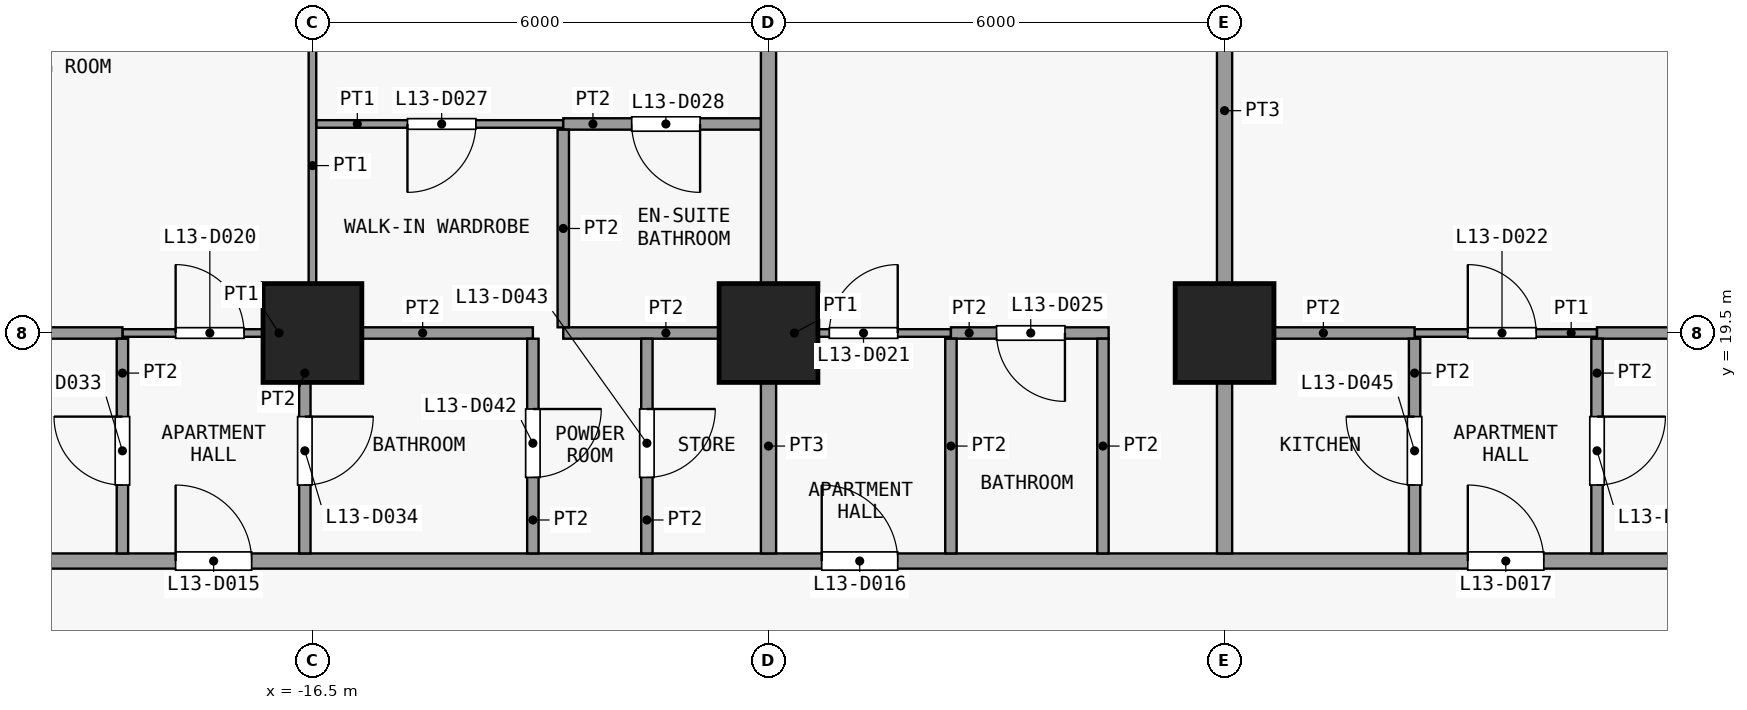
"""IFC4 building model, lengths in metres.
Left out: names, types, materials, properties, quantities, classifications, styles, units other than length and angle.
Written with IfcOpenShell. Run it as: python <this file> out.ifc"""

import sys

from ifc_helpers import new_model, si_unit, direction, frame, frame_2d, origin, origin_2d, place, context, subcontext, project, spatial, rectangle, extrude, element, fill, save


model = new_model("IFC4")
c1 = context("Model", 3, precision=1e-05, world=origin(), true_north=direction((0.0, 1.0)))
c2 = subcontext(c1, "Body", "Model", "MODEL_VIEW")
j1 = project(units=[si_unit("LENGTHUNIT", "METRE"), si_unit("PLANEANGLEUNIT", "RADIAN")], contexts=[c1])
p1 = place(None, origin())
s1 = spatial("IfcSite", under=j1, at=p1, CompositionType="ELEMENT")
p2 = place(p1, origin())
s2 = spatial("IfcBuilding", under=s1, at=p2, CompositionType="ELEMENT")
p3 = place(p2, frame((0.0, 0.0, 57.7)))
s3 = spatial("IfcBuildingStorey", under=s2, at=p3, CompositionType="ELEMENT", Elevation=57.7)
for number, where, z_axis, x_axis in (
    (1, (-16.5, 19.5, 0.0), (0.0, 0.0, 1.0), (1.0, 0.0, 0.0)),
    (2, (-10.5, 19.5, 0.0), (0.0, 0.0, 1.0), (1.0, 0.0, 0.0)),
    (3, (-4.5, 19.5, 0.0), (0.0, 0.0, 1.0), (1.0, 0.0, 0.0)),
):
    element("IfcColumn", number, at=place(p3, frame(where, z_axis=z_axis, x_axis=x_axis)), inside=s3, PredefinedType="COLUMN", context=c2, shape_type="SweptSolid", body=[
        extrude(rectangle(XDim=1.3, YDim=1.3, at=origin_2d()), origin(), (0.0, 0.0, 1.0), 3.6),
    ])
p4 = place(p3, frame((-25.35, 16.5, 0.0), z_axis=(0.0, 0.0, 1.0), x_axis=(1.0, 0.0, 0.0)))
e4 = element("IfcWall", 4, at=p4, inside=s3, PredefinedType="PARTITIONING", context=c2, shape_type="SweptSolid", body=[
    extrude(rectangle(XDim=50.7, YDim=0.2, at=frame_2d((25.35, 0.0))), origin(), (0.0, 0.0, 1.0), 3.3),
])
p5 = place(p4, frame((7.05, 0.0, 0.0)))
e5 = element("IfcOpeningElement", 5, at=p5, cuts=e4, PredefinedType="OPENING", context=c2, shape_type="SweptSolid", body=[
    extrude(rectangle(XDim=1.0, YDim=2.1, at=frame_2d((0.5, 1.05))), frame((0.0, 0.11, 0.0), z_axis=(0.0, -1.0, 0.0), x_axis=(1.0, 0.0, 0.0)), (0.0, 0.0, 1.0), 0.22),
])
p6 = place(p4, frame((15.55, 0.0, 0.0)))
e6 = element("IfcOpeningElement", 6, at=p6, cuts=e4, PredefinedType="OPENING", context=c2, shape_type="SweptSolid", body=[
    extrude(rectangle(XDim=1.0, YDim=2.1, at=frame_2d((0.5, 1.05))), frame((0.0, 0.11, 0.0), z_axis=(0.0, -1.0, 0.0), x_axis=(1.0, 0.0, 0.0)), (0.0, 0.0, 1.0), 0.22),
])
p7 = place(p4, frame((24.05, 0.0, 0.0)))
e7 = element("IfcOpeningElement", 7, at=p7, cuts=e4, PredefinedType="OPENING", context=c2, shape_type="SweptSolid", body=[
    extrude(rectangle(XDim=1.0, YDim=2.1, at=frame_2d((0.5, 1.05))), frame((0.0, 0.11, 0.0), z_axis=(0.0, -1.0, 0.0), x_axis=(1.0, 0.0, 0.0)), (0.0, 0.0, 1.0), 0.22),
])
p8 = place(p4, frame((36.55, 0.0, 0.0)))
e8 = element("IfcOpeningElement", 8, at=p8, cuts=e4, PredefinedType="OPENING", context=c2, shape_type="SweptSolid", body=[
    extrude(rectangle(XDim=1.0, YDim=2.1, at=frame_2d((0.5, 1.05))), frame((0.0, 0.11, 0.0), z_axis=(0.0, -1.0, 0.0), x_axis=(1.0, 0.0, 0.0)), (0.0, 0.0, 1.0), 0.22),
])
p9 = place(p4, frame((45.05, 0.0, 0.0)))
e9 = element("IfcOpeningElement", 9, at=p9, cuts=e4, PredefinedType="OPENING", context=c2, shape_type="SweptSolid", body=[
    extrude(rectangle(XDim=1.0, YDim=2.1, at=frame_2d((0.5, 1.05))), frame((0.0, 0.11, 0.0), z_axis=(0.0, -1.0, 0.0), x_axis=(1.0, 0.0, 0.0)), (0.0, 0.0, 1.0), 0.22),
])
p10 = place(p3, frame((-19.0, 19.5, 0.0), z_axis=(0.0, 0.0, 1.0), x_axis=(1.0, 0.0, 0.0)))
e10 = element("IfcWall", 10, at=p10, inside=s3, PredefinedType="PARTITIONING", context=c2, shape_type="SweptSolid", body=[
    extrude(rectangle(XDim=2.4, YDim=0.1, at=frame_2d((1.2, 0.0))), origin(), (0.0, 0.0, 1.0), 3.3),
])
p11 = place(p10, frame((0.7, 0.0, 0.0)))
e11 = element("IfcOpeningElement", 11, at=p11, cuts=e10, PredefinedType="OPENING", context=c2, shape_type="SweptSolid", body=[
    extrude(rectangle(XDim=0.9, YDim=2.1, at=frame_2d((0.45, 1.05))), frame((0.0, 0.06, 0.0), z_axis=(0.0, -1.0, 0.0), x_axis=(1.0, 0.0, 0.0)), (0.0, 0.0, 1.0), 0.12),
])
p12 = place(p3, frame((-10.5, 19.5, 0.0), z_axis=(0.0, 0.0, 1.0), x_axis=(1.0, 0.0, 0.0)))
e12 = element("IfcWall", 12, at=p12, inside=s3, PredefinedType="PARTITIONING", context=c2, shape_type="SweptSolid", body=[
    extrude(rectangle(XDim=2.4, YDim=0.1, at=frame_2d((1.2, 0.0))), origin(), (0.0, 0.0, 1.0), 3.3),
])
p13 = place(p12, frame((0.8, 0.0, 0.0)))
e13 = element("IfcOpeningElement", 13, at=p13, cuts=e12, PredefinedType="OPENING", context=c2, shape_type="SweptSolid", body=[
    extrude(rectangle(XDim=0.9, YDim=2.1, at=frame_2d((0.45, 1.05))), frame((0.0, 0.06, 0.0), z_axis=(0.0, -1.0, 0.0), x_axis=(1.0, 0.0, 0.0)), (0.0, 0.0, 1.0), 0.12),
])
p14 = place(p3, frame((-2.0, 19.5, 0.0), z_axis=(0.0, 0.0, 1.0), x_axis=(1.0, 0.0, 0.0)))
e14 = element("IfcWall", 14, at=p14, inside=s3, PredefinedType="PARTITIONING", context=c2, shape_type="SweptSolid", body=[
    extrude(rectangle(XDim=2.4, YDim=0.1, at=frame_2d((1.2, 0.0))), origin(), (0.0, 0.0, 1.0), 3.3),
])
p15 = place(p14, frame((0.7, 0.0, 0.0)))
e15 = element("IfcOpeningElement", 15, at=p15, cuts=e14, PredefinedType="OPENING", context=c2, shape_type="SweptSolid", body=[
    extrude(rectangle(XDim=0.9, YDim=2.1, at=frame_2d((0.45, 1.05))), frame((0.0, 0.06, 0.0), z_axis=(0.0, -1.0, 0.0), x_axis=(1.0, 0.0, 0.0)), (0.0, 0.0, 1.0), 0.12),
])
p16 = place(p3, frame((-23.5, 19.5, 0.0), z_axis=(0.0, 0.0, 1.0), x_axis=(1.0, 0.0, 0.0)))
e16 = element("IfcWall", 16, at=p16, inside=s3, PredefinedType="PARTITIONING", context=c2, shape_type="SweptSolid", body=[
    extrude(rectangle(XDim=4.5, YDim=0.15, at=frame_2d((2.25, 0.0))), origin(), (0.0, 0.0, 1.0), 3.3),
])
p17 = place(p3, frame((-16.5, 19.5, 0.0), z_axis=(0.0, 0.0, 1.0), x_axis=(1.0, 0.0, 0.0)))
e17 = element("IfcWall", 17, at=p17, inside=s3, PredefinedType="PARTITIONING", context=c2, shape_type="SweptSolid", body=[
    extrude(rectangle(XDim=2.9, YDim=0.15, at=frame_2d((1.45, 0.0))), origin(), (0.0, 0.0, 1.0), 3.3),
])
p18 = place(p3, frame((-13.2, 19.5, 0.0), z_axis=(0.0, 0.0, 1.0), x_axis=(1.0, 0.0, 0.0)))
e18 = element("IfcWall", 18, at=p18, inside=s3, PredefinedType="PARTITIONING", context=c2, shape_type="SweptSolid", body=[
    extrude(rectangle(XDim=2.7, YDim=0.15, at=frame_2d((1.35, 0.0))), origin(), (0.0, 0.0, 1.0), 3.3),
])
p19 = place(p3, frame((-8.1, 19.5, 0.0), z_axis=(0.0, 0.0, 1.0), x_axis=(1.0, 0.0, 0.0)))
e19 = element("IfcWall", 19, at=p19, inside=s3, PredefinedType="PARTITIONING", context=c2, shape_type="SweptSolid", body=[
    extrude(rectangle(XDim=2.075, YDim=0.15, at=frame_2d((1.038, 0.0))), origin(), (0.0, 0.0, 1.0), 3.3),
])
p20 = place(p19, frame((0.6, 0.0, 0.0)))
e20 = element("IfcOpeningElement", 20, at=p20, cuts=e19, PredefinedType="OPENING", context=c2, shape_type="SweptSolid", body=[
    extrude(rectangle(XDim=0.9, YDim=2.1, at=frame_2d((0.45, 1.05))), frame((0.0, 0.085, 0.0), z_axis=(0.0, -1.0, 0.0), x_axis=(1.0, 0.0, 0.0)), (0.0, 0.0, 1.0), 0.17),
])
p21 = place(p3, frame((-4.4, 19.5, 0.0), z_axis=(0.0, 0.0, 1.0), x_axis=(1.0, 0.0, 0.0)))
e21 = element("IfcWall", 21, at=p21, inside=s3, PredefinedType="PARTITIONING", context=c2, shape_type="SweptSolid", body=[
    extrude(rectangle(XDim=2.4, YDim=0.15, at=frame_2d((1.2, 0.0))), origin(), (0.0, 0.0, 1.0), 3.3),
])
p22 = place(p3, frame((0.4, 19.5, 0.0), z_axis=(0.0, 0.0, 1.0), x_axis=(1.0, 0.0, 0.0)))
e22 = element("IfcWall", 22, at=p22, inside=s3, PredefinedType="PARTITIONING", context=c2, shape_type="SweptSolid", body=[
    extrude(rectangle(XDim=7.4, YDim=0.15, at=frame_2d((3.7, 0.0))), origin(), (0.0, 0.0, 1.0), 3.3),
])
p23 = place(p3, frame((-16.45, 22.25, 0.0), z_axis=(0.0, 0.0, 1.0), x_axis=(1.0, 0.0, 0.0)))
e23 = element("IfcWall", 23, at=p23, inside=s3, PredefinedType="PARTITIONING", context=c2, shape_type="SweptSolid", body=[
    extrude(rectangle(XDim=3.25, YDim=0.1, at=frame_2d((1.625, 0.0))), origin(), (0.0, 0.0, 1.0), 3.3),
])
p24 = place(p23, frame((1.2, 0.0, 0.0)))
e24 = element("IfcOpeningElement", 24, at=p24, cuts=e23, PredefinedType="OPENING", context=c2, shape_type="SweptSolid", body=[
    extrude(rectangle(XDim=0.9, YDim=2.1, at=frame_2d((0.45, 1.05))), frame((0.0, 0.06, 0.0), z_axis=(0.0, -1.0, 0.0), x_axis=(1.0, 0.0, 0.0)), (0.0, 0.0, 1.0), 0.12),
])
p25 = place(p3, frame((-13.2, 22.25, 0.0), z_axis=(0.0, 0.0, 1.0), x_axis=(1.0, 0.0, 0.0)))
e25 = element("IfcWall", 25, at=p25, inside=s3, PredefinedType="PARTITIONING", context=c2, shape_type="SweptSolid", body=[
    extrude(rectangle(XDim=2.6, YDim=0.15, at=frame_2d((1.3, 0.0))), origin(), (0.0, 0.0, 1.0), 3.3),
])
p26 = place(p25, frame((0.9, 0.0, 0.0)))
e26 = element("IfcOpeningElement", 26, at=p26, cuts=e25, PredefinedType="OPENING", context=c2, shape_type="SweptSolid", body=[
    extrude(rectangle(XDim=0.9, YDim=2.1, at=frame_2d((0.45, 1.05))), frame((0.0, 0.085, 0.0), z_axis=(0.0, -1.0, 0.0), x_axis=(1.0, 0.0, 0.0)), (0.0, 0.0, 1.0), 0.17),
])
p27 = place(p3, frame((-19.0, 16.6, 0.0), z_axis=(0.0, 0.0, 1.0), x_axis=(0.0, 1.0, 0.0)))
e27 = element("IfcWall", 27, at=p27, inside=s3, PredefinedType="PARTITIONING", context=c2, shape_type="SweptSolid", body=[
    extrude(rectangle(XDim=2.825, YDim=0.15, at=frame_2d((1.413, 0.0))), origin(), (0.0, 0.0, 1.0), 3.3),
])
p28 = place(p27, frame((0.9, 0.0, 0.0)))
e28 = element("IfcOpeningElement", 28, at=p28, cuts=e27, PredefinedType="OPENING", context=c2, shape_type="SweptSolid", body=[
    extrude(rectangle(XDim=0.9, YDim=2.1, at=frame_2d((0.45, 1.05))), frame((0.0, 0.085, 0.0), z_axis=(0.0, -1.0, 0.0), x_axis=(1.0, 0.0, 0.0)), (0.0, 0.0, 1.0), 0.17),
])
p29 = place(p3, frame((-16.6, 16.6, 0.0), z_axis=(0.0, 0.0, 1.0), x_axis=(0.0, 1.0, 0.0)))
e29 = element("IfcWall", 29, at=p29, inside=s3, PredefinedType="PARTITIONING", context=c2, shape_type="SweptSolid", body=[
    extrude(rectangle(XDim=2.825, YDim=0.15, at=frame_2d((1.413, 0.0))), origin(), (0.0, 0.0, 1.0), 3.3),
])
p30 = place(p29, frame((0.9, 0.0, 0.0)))
e30 = element("IfcOpeningElement", 30, at=p30, cuts=e29, PredefinedType="OPENING", context=c2, shape_type="SweptSolid", body=[
    extrude(rectangle(XDim=0.9, YDim=2.1, at=frame_2d((0.45, 1.05))), frame((0.0, 0.085, 0.0), z_axis=(0.0, -1.0, 0.0), x_axis=(1.0, 0.0, 0.0)), (0.0, 0.0, 1.0), 0.17),
])
p31 = place(p3, frame((-16.5, 19.575, 0.0), z_axis=(0.0, 0.0, 1.0), x_axis=(0.0, 1.0, 0.0)))
e31 = element("IfcWall", 31, at=p31, inside=s3, PredefinedType="PARTITIONING", context=c2, shape_type="SweptSolid", body=[
    extrude(rectangle(XDim=8.675, YDim=0.1, at=frame_2d((4.337, 0.0))), origin(), (0.0, 0.0, 1.0), 3.3),
])
p32 = place(p31, frame((4.375, 0.0, 0.0)))
e32 = element("IfcOpeningElement", 32, at=p32, cuts=e31, PredefinedType="OPENING", context=c2, shape_type="SweptSolid", body=[
    extrude(rectangle(XDim=0.9, YDim=2.1, at=frame_2d((0.45, 1.05))), frame((0.0, 0.06, 0.0), z_axis=(0.0, -1.0, 0.0), x_axis=(1.0, 0.0, 0.0)), (0.0, 0.0, 1.0), 0.12),
])
p33 = place(p3, frame((-13.6, 16.6, 0.0), z_axis=(0.0, 0.0, 1.0), x_axis=(0.0, 1.0, 0.0)))
e33 = element("IfcWall", 33, at=p33, inside=s3, PredefinedType="PARTITIONING", context=c2, shape_type="SweptSolid", body=[
    extrude(rectangle(XDim=2.825, YDim=0.15, at=frame_2d((1.413, 0.0))), origin(), (0.0, 0.0, 1.0), 3.3),
])
p34 = place(p33, frame((1.0, 0.0, 0.0)))
e34 = element("IfcOpeningElement", 34, at=p34, cuts=e33, PredefinedType="OPENING", context=c2, shape_type="SweptSolid", body=[
    extrude(rectangle(XDim=0.9, YDim=2.1, at=frame_2d((0.45, 1.05))), frame((0.0, 0.085, 0.0), z_axis=(0.0, -1.0, 0.0), x_axis=(1.0, 0.0, 0.0)), (0.0, 0.0, 1.0), 0.17),
])
p35 = place(p3, frame((-13.2, 19.575, 0.0), z_axis=(0.0, 0.0, 1.0), x_axis=(0.0, 1.0, 0.0)))
e35 = element("IfcWall", 35, at=p35, inside=s3, PredefinedType="PARTITIONING", context=c2, shape_type="SweptSolid", body=[
    extrude(rectangle(XDim=2.6, YDim=0.15, at=frame_2d((1.3, 0.0))), origin(), (0.0, 0.0, 1.0), 3.3),
])
p36 = place(p3, frame((-12.1, 16.6, 0.0), z_axis=(0.0, 0.0, 1.0), x_axis=(0.0, 1.0, 0.0)))
e36 = element("IfcWall", 36, at=p36, inside=s3, PredefinedType="PARTITIONING", context=c2, shape_type="SweptSolid", body=[
    extrude(rectangle(XDim=2.825, YDim=0.15, at=frame_2d((1.413, 0.0))), origin(), (0.0, 0.0, 1.0), 3.3),
])
p37 = place(p36, frame((1.0, 0.0, 0.0)))
e37 = element("IfcOpeningElement", 37, at=p37, cuts=e36, PredefinedType="OPENING", context=c2, shape_type="SweptSolid", body=[
    extrude(rectangle(XDim=0.9, YDim=2.1, at=frame_2d((0.45, 1.05))), frame((0.0, 0.085, 0.0), z_axis=(0.0, -1.0, 0.0), x_axis=(1.0, 0.0, 0.0)), (0.0, 0.0, 1.0), 0.17),
])
p38 = place(p3, frame((-10.5, 16.6, 0.0), z_axis=(0.0, 0.0, 1.0), x_axis=(0.0, 1.0, 0.0)))
e38 = element("IfcWall", 38, at=p38, inside=s3, PredefinedType="PARTITIONING", context=c2, shape_type="SweptSolid", body=[
    extrude(rectangle(XDim=2.825, YDim=0.2, at=frame_2d((1.413, 0.0))), origin(), (0.0, 0.0, 1.0), 3.3),
])
p39 = place(p3, frame((-10.5, 19.575, 0.0), z_axis=(0.0, 0.0, 1.0), x_axis=(0.0, 1.0, 0.0)))
e39 = element("IfcWall", 39, at=p39, inside=s3, PredefinedType="PARTITIONING", context=c2, shape_type="SweptSolid", body=[
    extrude(rectangle(XDim=8.675, YDim=0.2, at=frame_2d((4.337, 0.0))), origin(), (0.0, 0.0, 1.0), 3.3),
])
for number, where, z_axis, x_axis in (
    (40, (-8.1, 16.6, 0.0), (0.0, 0.0, 1.0), (0.0, 1.0, 0.0)),
    (41, (-6.1, 16.6, 0.0), (0.0, 0.0, 1.0), (0.0, 1.0, 0.0)),
):
    element("IfcWall", number, at=place(p3, frame(where, z_axis=z_axis, x_axis=x_axis)), inside=s3, PredefinedType="PARTITIONING", context=c2, shape_type="SweptSolid", body=[
        extrude(rectangle(XDim=2.825, YDim=0.15, at=frame_2d((1.413, 0.0))), origin(), (0.0, 0.0, 1.0), 3.3),
    ])
p40 = place(p3, frame((-4.5, 16.6, 0.0), z_axis=(0.0, 0.0, 1.0), x_axis=(0.0, 1.0, 0.0)))
e42 = element("IfcWall", 42, at=p40, inside=s3, PredefinedType="PARTITIONING", context=c2, shape_type="SweptSolid", body=[
    extrude(rectangle(XDim=11.65, YDim=0.2, at=frame_2d((5.825, 0.0))), origin(), (0.0, 0.0, 1.0), 3.3),
])
p41 = place(p3, frame((-2.0, 16.6, 0.0), z_axis=(0.0, 0.0, 1.0), x_axis=(0.0, 1.0, 0.0)))
e43 = element("IfcWall", 43, at=p41, inside=s3, PredefinedType="PARTITIONING", context=c2, shape_type="SweptSolid", body=[
    extrude(rectangle(XDim=2.825, YDim=0.15, at=frame_2d((1.413, 0.0))), origin(), (0.0, 0.0, 1.0), 3.3),
])
p42 = place(p41, frame((0.9, 0.0, 0.0)))
e44 = element("IfcOpeningElement", 44, at=p42, cuts=e43, PredefinedType="OPENING", context=c2, shape_type="SweptSolid", body=[
    extrude(rectangle(XDim=0.9, YDim=2.1, at=frame_2d((0.45, 1.05))), frame((0.0, 0.085, 0.0), z_axis=(0.0, -1.0, 0.0), x_axis=(1.0, 0.0, 0.0)), (0.0, 0.0, 1.0), 0.17),
])
p43 = place(p3, frame((0.4, 16.6, 0.0), z_axis=(0.0, 0.0, 1.0), x_axis=(0.0, 1.0, 0.0)))
e45 = element("IfcWall", 45, at=p43, inside=s3, PredefinedType="PARTITIONING", context=c2, shape_type="SweptSolid", body=[
    extrude(rectangle(XDim=2.825, YDim=0.15, at=frame_2d((1.413, 0.0))), origin(), (0.0, 0.0, 1.0), 3.3),
])
p44 = place(p43, frame((0.9, 0.0, 0.0)))
e46 = element("IfcOpeningElement", 46, at=p44, cuts=e45, PredefinedType="OPENING", context=c2, shape_type="SweptSolid", body=[
    extrude(rectangle(XDim=0.9, YDim=2.1, at=frame_2d((0.45, 1.05))), frame((0.0, 0.085, 0.0), z_axis=(0.0, -1.0, 0.0), x_axis=(1.0, 0.0, 0.0)), (0.0, 0.0, 1.0), 0.17),
])
p45 = place(p5, origin())
e47 = element("IfcDoor", 47, at=p45, inside=s3, OperationType="SINGLE_SWING_RIGHT", PredefinedType="DOOR", context=c2, shape_type="SweptSolid", body=[
    extrude(rectangle(XDim=1.0, YDim=2.1, at=frame_2d((0.5, 1.05))), frame((0.0, 0.025, 0.0), z_axis=(0.0, -1.0, 0.0), x_axis=(1.0, 0.0, 0.0)), (0.0, 0.0, 1.0), 0.05),
])
fill(e5, e47)
p46 = place(p6, origin())
e48 = element("IfcDoor", 48, at=p46, inside=s3, OperationType="SINGLE_SWING_RIGHT", PredefinedType="DOOR", context=c2, shape_type="SweptSolid", body=[
    extrude(rectangle(XDim=1.0, YDim=2.1, at=frame_2d((0.5, 1.05))), frame((0.0, 0.025, 0.0), z_axis=(0.0, -1.0, 0.0), x_axis=(1.0, 0.0, 0.0)), (0.0, 0.0, 1.0), 0.05),
])
fill(e6, e48)
p47 = place(p7, origin())
e49 = element("IfcDoor", 49, at=p47, inside=s3, OperationType="SINGLE_SWING_RIGHT", PredefinedType="DOOR", context=c2, shape_type="SweptSolid", body=[
    extrude(rectangle(XDim=1.0, YDim=2.1, at=frame_2d((0.5, 1.05))), frame((0.0, 0.025, 0.0), z_axis=(0.0, -1.0, 0.0), x_axis=(1.0, 0.0, 0.0)), (0.0, 0.0, 1.0), 0.05),
])
fill(e7, e49)
p48 = place(p11, origin())
e50 = element("IfcDoor", 50, at=p48, inside=s3, OperationType="SINGLE_SWING_RIGHT", PredefinedType="DOOR", context=c2, shape_type="SweptSolid", body=[
    extrude(rectangle(XDim=0.9, YDim=2.1, at=frame_2d((0.45, 1.05))), frame((0.0, 0.025, 0.0), z_axis=(0.0, -1.0, 0.0), x_axis=(1.0, 0.0, 0.0)), (0.0, 0.0, 1.0), 0.05),
])
fill(e11, e50)
p49 = place(p13, origin())
e51 = element("IfcDoor", 51, at=p49, inside=s3, OperationType="SINGLE_SWING_LEFT", PredefinedType="DOOR", context=c2, shape_type="SweptSolid", body=[
    extrude(rectangle(XDim=0.9, YDim=2.1, at=frame_2d((0.45, 1.05))), frame((0.0, 0.025, 0.0), z_axis=(0.0, -1.0, 0.0), x_axis=(1.0, 0.0, 0.0)), (0.0, 0.0, 1.0), 0.05),
])
fill(e13, e51)
p50 = place(p15, origin())
e52 = element("IfcDoor", 52, at=p50, inside=s3, OperationType="SINGLE_SWING_RIGHT", PredefinedType="DOOR", context=c2, shape_type="SweptSolid", body=[
    extrude(rectangle(XDim=0.9, YDim=2.1, at=frame_2d((0.45, 1.05))), frame((0.0, 0.025, 0.0), z_axis=(0.0, -1.0, 0.0), x_axis=(1.0, 0.0, 0.0)), (0.0, 0.0, 1.0), 0.05),
])
fill(e15, e52)
p51 = place(p20, origin())
e53 = element("IfcDoor", 53, at=p51, inside=s3, OperationType="SINGLE_SWING_RIGHT", PredefinedType="DOOR", context=c2, shape_type="SweptSolid", body=[
    extrude(rectangle(XDim=0.9, YDim=2.1, at=frame_2d((0.45, 1.05))), frame((0.0, 0.025, 0.0), z_axis=(0.0, -1.0, 0.0), x_axis=(1.0, 0.0, 0.0)), (0.0, 0.0, 1.0), 0.05),
])
fill(e20, e53)
p52 = place(p24, origin())
e54 = element("IfcDoor", 54, at=p52, inside=s3, OperationType="SINGLE_SWING_LEFT", PredefinedType="DOOR", context=c2, shape_type="SweptSolid", body=[
    extrude(rectangle(XDim=0.9, YDim=2.1, at=frame_2d((0.45, 1.05))), frame((0.0, 0.025, 0.0), z_axis=(0.0, -1.0, 0.0), x_axis=(1.0, 0.0, 0.0)), (0.0, 0.0, 1.0), 0.05),
])
fill(e24, e54)
p53 = place(p26, origin())
e55 = element("IfcDoor", 55, at=p53, inside=s3, OperationType="SINGLE_SWING_RIGHT", PredefinedType="DOOR", context=c2, shape_type="SweptSolid", body=[
    extrude(rectangle(XDim=0.9, YDim=2.1, at=frame_2d((0.45, 1.05))), frame((0.0, 0.025, 0.0), z_axis=(0.0, -1.0, 0.0), x_axis=(1.0, 0.0, 0.0)), (0.0, 0.0, 1.0), 0.05),
])
fill(e26, e55)
p54 = place(p28, origin())
e56 = element("IfcDoor", 56, at=p54, inside=s3, OperationType="SINGLE_SWING_LEFT", PredefinedType="DOOR", context=c2, shape_type="SweptSolid", body=[
    extrude(rectangle(XDim=0.9, YDim=2.1, at=frame_2d((0.45, 1.05))), frame((0.0, 0.025, 0.0), z_axis=(0.0, -1.0, 0.0), x_axis=(1.0, 0.0, 0.0)), (0.0, 0.0, 1.0), 0.05),
])
fill(e28, e56)
p55 = place(p30, origin())
e57 = element("IfcDoor", 57, at=p55, inside=s3, OperationType="SINGLE_SWING_RIGHT", PredefinedType="DOOR", context=c2, shape_type="SweptSolid", body=[
    extrude(rectangle(XDim=0.9, YDim=2.1, at=frame_2d((0.45, 1.05))), frame((0.0, 0.025, 0.0), z_axis=(0.0, -1.0, 0.0), x_axis=(1.0, 0.0, 0.0)), (0.0, 0.0, 1.0), 0.05),
])
fill(e30, e57)
p56 = place(p34, origin())
e58 = element("IfcDoor", 58, at=p56, inside=s3, OperationType="SINGLE_SWING_RIGHT", PredefinedType="DOOR", context=c2, shape_type="SweptSolid", body=[
    extrude(rectangle(XDim=0.9, YDim=2.1, at=frame_2d((0.45, 1.05))), frame((0.0, 0.025, 0.0), z_axis=(0.0, -1.0, 0.0), x_axis=(1.0, 0.0, 0.0)), (0.0, 0.0, 1.0), 0.05),
])
fill(e34, e58)
p57 = place(p37, origin())
e59 = element("IfcDoor", 59, at=p57, inside=s3, OperationType="SINGLE_SWING_RIGHT", PredefinedType="DOOR", context=c2, shape_type="SweptSolid", body=[
    extrude(rectangle(XDim=0.9, YDim=2.1, at=frame_2d((0.45, 1.05))), frame((0.0, 0.025, 0.0), z_axis=(0.0, -1.0, 0.0), x_axis=(1.0, 0.0, 0.0)), (0.0, 0.0, 1.0), 0.05),
])
fill(e37, e59)
p58 = place(p42, origin())
e60 = element("IfcDoor", 60, at=p58, inside=s3, OperationType="SINGLE_SWING_LEFT", PredefinedType="DOOR", context=c2, shape_type="SweptSolid", body=[
    extrude(rectangle(XDim=0.9, YDim=2.1, at=frame_2d((0.45, 1.05))), frame((0.0, 0.025, 0.0), z_axis=(0.0, -1.0, 0.0), x_axis=(1.0, 0.0, 0.0)), (0.0, 0.0, 1.0), 0.05),
])
fill(e44, e60)
p59 = place(p44, origin())
e61 = element("IfcDoor", 61, at=p59, inside=s3, OperationType="SINGLE_SWING_RIGHT", PredefinedType="DOOR", context=c2, shape_type="SweptSolid", body=[
    extrude(rectangle(XDim=0.9, YDim=2.1, at=frame_2d((0.45, 1.05))), frame((0.0, 0.025, 0.0), z_axis=(0.0, -1.0, 0.0), x_axis=(1.0, 0.0, 0.0)), (0.0, 0.0, 1.0), 0.05),
])
fill(e46, e61)
save(model, sys.argv[1])
